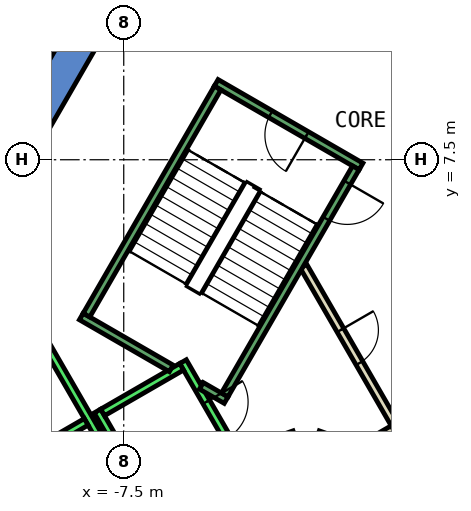
"""IFC4 building model, lengths in metres.
Left out: names, types, materials, properties, quantities, classifications, styles, units other than length and angle.
Written with IfcOpenShell. Run it as: python <this file> out.ifc"""

import sys

from ifc_helpers import new_model, si_unit, direction, frame, frame_2d, origin, place, context, subcontext, project, spatial, polyline, rectangle, outline, extrude, element, fill, save


model = new_model("IFC4")
c1 = context("Model", 3, precision=1e-05, world=origin(), true_north=direction((0.0, 1.0)))
c2 = subcontext(c1, "Body", "Model", "MODEL_VIEW")
j1 = project(units=[si_unit("LENGTHUNIT", "METRE"), si_unit("PLANEANGLEUNIT", "RADIAN")], contexts=[c1])
p1 = place(None, origin())
s1 = spatial("IfcSite", under=j1, at=p1, CompositionType="ELEMENT")
p2 = place(p1, origin())
s2 = spatial("IfcBuilding", under=s1, at=p2, CompositionType="ELEMENT")
p3 = place(p2, frame((0.0, 0.0, 111.8)))
s3 = spatial("IfcBuildingStorey", under=s2, at=p3, CompositionType="ELEMENT", Elevation=111.8)
p4 = place(p3, frame((0.0, 0.0, -0.4)))
e1 = element("IfcWall", 1, at=p4, inside=s3, PredefinedType="SHEAR", context=c2, shape_type="SweptSolid", body=[
    extrude(outline(polyline([(-12.267, 5.252), (-11.488, 4.802), (-6.409, 13.6), (-6.928, 14.5), (-12.267, 5.252)])), origin(), (0.0, 0.0, 1.0), 4.2),
])
p5 = place(p3, frame((0.0, 0.0, -0.4)))
e2 = element("IfcWall", 2, at=p5, inside=s3, PredefinedType="SHEAR", context=c2, shape_type="SweptSolid", body=[
    extrude(outline(polyline([(-13.856, 2.5), (-6.928, -9.5), (-6.409, -8.6), (-12.817, 2.5), (-13.856, 2.5)])), origin(), (0.0, 0.0, 1.0), 4.2),
])
p6 = place(p3, frame((-0.52, -1.0, 0.0), z_axis=(0.0, 0.0, 1.0), x_axis=(0.50011622646, 0.865958290007, 0.0)))
e3 = element("IfcWall", 3, at=p6, inside=s3, PredefinedType="PARTITIONING", context=c2, shape_type="SweptSolid", body=[
    extrude(rectangle(XDim=4.991, YDim=0.2, at=frame_2d((2.496, 0.0))), origin(), (0.0, 0.0, 1.0), 3.8),
])
p7 = place(p6, frame((1.945, 0.0, 0.0)))
e4 = element("IfcOpeningElement", 4, at=p7, cuts=e3, PredefinedType="OPENING", context=c2, shape_type="SweptSolid", body=[
    extrude(rectangle(XDim=1.0, YDim=2.1, at=frame_2d((0.5, 1.05))), frame((0.0, 0.11, 0.0), z_axis=(0.0, -1.0, 0.0), x_axis=(1.0, 0.0, 0.0)), (0.0, 0.0, 1.0), 0.22),
])
p8 = place(p3, frame((-2.771, 4.7, 0.0), z_axis=(0.0, 0.0, 1.0), x_axis=(0.499969479948, -0.866043023828, 0.0)))
e5 = element("IfcWall", 5, at=p8, inside=s3, PredefinedType="PARTITIONING", context=c2, shape_type="SweptSolid", body=[
    extrude(rectangle(XDim=4.99, YDim=0.2, at=frame_2d((2.495, 0.0))), origin(), (0.0, 0.0, 1.0), 3.8),
])
p9 = place(p8, frame((1.945, 0.0, 0.0)))
e6 = element("IfcOpeningElement", 6, at=p9, cuts=e5, PredefinedType="OPENING", context=c2, shape_type="SweptSolid", body=[
    extrude(rectangle(XDim=1.0, YDim=2.1, at=frame_2d((0.5, 1.05))), frame((0.0, 0.11, 0.0), z_axis=(0.0, -1.0, 0.0), x_axis=(1.0, 0.0, 0.0)), (0.0, 0.0, 1.0), 0.22),
])
p10 = place(p3, frame((-0.412, 0.414, 0.0), z_axis=(0.0, 0.0, 1.0), x_axis=(-0.866017369001, -0.500013916395, 0.0)))
e7 = element("IfcWall", 7, at=p10, inside=s3, PredefinedType="PARTITIONING", context=c2, shape_type="SweptSolid", body=[
    extrude(rectangle(XDim=1.45, YDim=0.2, at=frame_2d((0.725, 0.0))), origin(), (0.0, 0.0, 1.0), 3.8),
])
p11 = place(p3, frame((-2.07, 0.16, 0.0), z_axis=(0.0, 0.0, 1.0), x_axis=(-0.942199461132, 0.335052496547, 0.0)))
e8 = element("IfcWall", 8, at=p11, inside=s3, PredefinedType="PARTITIONING", context=c2, shape_type="SweptSolid", body=[
    extrude(rectangle(XDim=0.337, YDim=0.2, at=frame_2d((0.169, 0.0))), origin(), (0.0, 0.0, 1.0), 3.8),
])
p12 = place(p3, frame((-3.012, 0.273, 0.0), z_axis=(0.0, 0.0, 1.0), x_axis=(-0.942280615813, -0.334824194261, 0.0)))
e9 = element("IfcWall", 9, at=p12, inside=s3, PredefinedType="PARTITIONING", context=c2, shape_type="SweptSolid", body=[
    extrude(rectangle(XDim=0.338, YDim=0.2, at=frame_2d((0.169, 0.0))), origin(), (0.0, 0.0, 1.0), 3.8),
])
p13 = place(p3, frame((-5.94, 2.188, 0.0), z_axis=(0.0, 0.0, 1.0), x_axis=(0.49994636267, -0.866056369097, 0.0)))
e10 = element("IfcWall", 10, at=p13, inside=s3, PredefinedType="STANDARD", context=c2, shape_type="SweptSolid", body=[
    extrude(rectangle(XDim=2.8, YDim=0.2, at=frame_2d((1.4, 0.0))), origin(), (0.0, 0.0, 1.0), 3.8),
])
p14 = place(p13, frame((1.225, 0.0, 0.0)))
e11 = element("IfcOpeningElement", 11, at=p14, cuts=e10, PredefinedType="OPENING", context=c2, shape_type="SweptSolid", body=[
    extrude(rectangle(XDim=1.1, YDim=2.1, at=frame_2d((0.55, 1.05))), frame((0.0, 0.11, 0.0), z_axis=(0.0, -1.0, 0.0), x_axis=(1.0, 0.0, 0.0)), (0.0, 0.0, 1.0), 0.22),
])
p15 = place(p3, frame((-8.192, 0.888, 0.0), z_axis=(0.0, 0.0, 1.0), x_axis=(0.49994636267, -0.866056369097, 0.0)))
e12 = element("IfcWall", 12, at=p15, inside=s3, PredefinedType="STANDARD", context=c2, shape_type="SweptSolid", body=[
    extrude(rectangle(XDim=2.8, YDim=0.2, at=frame_2d((1.4, 0.0))), origin(), (0.0, 0.0, 1.0), 3.8),
])
p16 = place(p3, frame((-5.977, 2.052, 0.0), z_axis=(0.0, 0.0, 1.0), x_axis=(-0.865973769406, -0.500089422704, 0.0)))
e13 = element("IfcWall", 13, at=p16, inside=s3, PredefinedType="STANDARD", context=c2, shape_type="SweptSolid", body=[
    extrude(rectangle(XDim=2.399, YDim=0.2, at=frame_2d((1.2, 0.0))), origin(), (0.0, 0.0, 1.0), 3.8),
])
p17 = place(p3, frame((-9.751, 2.99, 0.0), z_axis=(0.0, 0.0, 1.0), x_axis=(0.50000090737, -0.866024879913, 0.0)))
e14 = element("IfcWall", 14, at=p17, inside=s3, PredefinedType="STANDARD", context=c2, shape_type="SweptSolid", body=[
    extrude(rectangle(XDim=10.6, YDim=0.2, at=frame_2d((5.3, 0.0))), origin(), (0.0, 0.0, 1.0), 3.8),
])
p18 = place(p3, frame((-8.488, 0.602, 0.0), z_axis=(0.0, 0.0, 1.0), x_axis=(-0.866022959057, -0.500004234368, 0.0)))
e15 = element("IfcWall", 15, at=p18, inside=s3, PredefinedType="STANDARD", context=c2, shape_type="SweptSolid", body=[
    extrude(rectangle(XDim=2.5, YDim=0.2, at=frame_2d((1.25, 0.0))), origin(), (0.0, 0.0, 1.0), 3.8),
])
p19 = place(p3, frame((-1.256, 7.324, 0.0), z_axis=(0.0, 0.0, 1.0), x_axis=(-0.866046073146, 0.499964197906, 0.0)))
e16 = element("IfcWall", 16, at=p19, inside=s3, PredefinedType="STANDARD", context=c2, shape_type="SweptSolid", body=[
    extrude(rectangle(XDim=4.4, YDim=0.2, at=frame_2d((2.2, 0.0))), origin(), (0.0, 0.0, 1.0), 3.8),
])
p20 = place(p19, frame((1.65, 0.0, 0.0)))
e17 = element("IfcOpeningElement", 17, at=p20, cuts=e16, PredefinedType="OPENING", context=c2, shape_type="SweptSolid", body=[
    extrude(rectangle(XDim=1.1, YDim=2.2, at=frame_2d((0.55, 1.1))), frame((0.0, 0.11, 0.0), z_axis=(0.0, -1.0, 0.0), x_axis=(1.0, 0.0, 0.0)), (0.0, 0.0, 1.0), 0.22),
])
p21 = place(p3, frame((-6.25, 2.01, 0.0), z_axis=(0.0, 0.0, 1.0), x_axis=(-0.86611865017, 0.499838457731, 0.0)))
e18 = element("IfcWall", 18, at=p21, inside=s3, PredefinedType="STANDARD", context=c2, shape_type="SweptSolid", body=[
    extrude(rectangle(XDim=2.733, YDim=0.2, at=frame_2d((1.366, 0.0))), origin(), (0.0, 0.0, 1.0), 3.8),
])
p22 = place(p3, frame((-4.806, 1.176, 0.0), z_axis=(0.0, 0.0, 1.0), x_axis=(-0.866558586415, 0.499075361355, 0.0)))
e19 = element("IfcWall", 19, at=p22, inside=s3, PredefinedType="STANDARD", context=c2, shape_type="SweptSolid", body=[
    extrude(rectangle(XDim=0.751, YDim=0.2, at=frame_2d((0.376, 0.0))), origin(), (0.0, 0.0, 1.0), 3.8),
])
p23 = place(p3, frame((-1.393, 7.288, 0.0), z_axis=(0.0, 0.0, 1.0), x_axis=(-0.499963383562, -0.866046543262, 0.0)))
e20 = element("IfcWall", 20, at=p23, inside=s3, PredefinedType="STANDARD", context=c2, shape_type="SweptSolid", body=[
    extrude(rectangle(XDim=6.9, YDim=0.2, at=frame_2d((3.45, 0.0))), origin(), (0.0, 0.0, 1.0), 3.8),
])
p24 = place(p23, frame((0.45, 0.0, 0.0)))
e21 = element("IfcOpeningElement", 21, at=p24, cuts=e20, PredefinedType="OPENING", context=c2, shape_type="SweptSolid", body=[
    extrude(rectangle(XDim=1.1, YDim=2.2, at=frame_2d((0.55, 1.1))), frame((0.0, 0.11, 0.0), z_axis=(0.0, -1.0, 0.0), x_axis=(1.0, 0.0, 0.0)), (0.0, 0.0, 1.0), 0.22),
])
p25 = place(p3, frame((-5.03, 9.388, 0.0), z_axis=(0.0, 0.0, 1.0), x_axis=(-0.499978703459, -0.866037698999, 0.0)))
e22 = element("IfcWall", 22, at=p25, inside=s3, PredefinedType="STANDARD", context=c2, shape_type="SweptSolid", body=[
    extrude(rectangle(XDim=6.9, YDim=0.2, at=frame_2d((3.45, 0.0))), origin(), (0.0, 0.0, 1.0), 3.8),
])
p26 = place(p9, origin())
e23 = element("IfcDoor", 23, at=p26, inside=s3, OperationType="SINGLE_SWING_RIGHT", PredefinedType="DOOR", context=c2, shape_type="SweptSolid", body=[
    extrude(rectangle(XDim=1.0, YDim=2.1, at=frame_2d((0.5, 1.05))), frame((0.0, 0.025, 0.0), z_axis=(0.0, -1.0, 0.0), x_axis=(1.0, 0.0, 0.0)), (0.0, 0.0, 1.0), 0.05),
])
fill(e6, e23)
p27 = place(p14, origin())
e24 = element("IfcDoor", 24, at=p27, inside=s3, OperationType="SLIDING_TO_LEFT", PredefinedType="DOOR", context=c2, shape_type="SweptSolid", body=[
    extrude(rectangle(XDim=1.1, YDim=2.1, at=frame_2d((0.55, 1.05))), frame((0.0, 0.025, 0.0), z_axis=(0.0, -1.0, 0.0), x_axis=(1.0, 0.0, 0.0)), (0.0, 0.0, 1.0), 0.05),
])
fill(e11, e24)
p28 = place(p24, origin())
e25 = element("IfcDoor", 25, at=p28, inside=s3, OperationType="SINGLE_SWING_LEFT", PredefinedType="DOOR", context=c2, shape_type="SweptSolid", body=[
    extrude(rectangle(XDim=1.1, YDim=2.2, at=frame_2d((0.55, 1.1))), frame((0.0, 0.025, 0.0), z_axis=(0.0, -1.0, 0.0), x_axis=(1.0, 0.0, 0.0)), (0.0, 0.0, 1.0), 0.05),
])
fill(e21, e25)
p29 = place(p20, origin())
e26 = element("IfcDoor", 26, at=p29, inside=s3, OperationType="SINGLE_SWING_LEFT", PredefinedType="DOOR", context=c2, shape_type="SweptSolid", body=[
    extrude(rectangle(XDim=1.1, YDim=2.2, at=frame_2d((0.55, 1.1))), frame((0.0, 0.025, 0.0), z_axis=(0.0, -1.0, 0.0), x_axis=(1.0, 0.0, 0.0)), (0.0, 0.0, 1.0), 0.05),
])
fill(e17, e26)
save(model, sys.argv[1])
